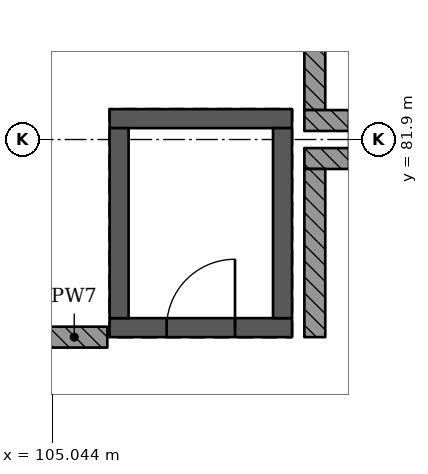
"""IFC4 building model, lengths in metres.
Left out: names, types, materials, properties, quantities, classifications, styles, units other than length and angle.
Written with IfcOpenShell. Run it as: python <this file> out.ifc"""

import sys

from ifc_helpers import new_model, si_unit, direction, frame, frame_2d, origin, place, context, subcontext, project, spatial, rectangle, extrude, element, fill, save


model = new_model("IFC4")
c1 = context("Model", 3, precision=1e-05, world=origin(), true_north=direction((0.0, 1.0)))
c2 = subcontext(c1, "Body", "Model", "MODEL_VIEW")
j1 = project(units=[si_unit("LENGTHUNIT", "METRE"), si_unit("PLANEANGLEUNIT", "RADIAN")], contexts=[c1])
p1 = place(None, origin())
s1 = spatial("IfcSite", under=j1, at=p1, CompositionType="ELEMENT")
p2 = place(p1, origin())
s2 = spatial("IfcBuilding", under=s1, at=p2, CompositionType="ELEMENT")
p3 = place(p2, frame((0.0, 0.0, 24.57)))
s3 = spatial("IfcBuildingStorey", under=s2, at=p3, CompositionType="ELEMENT", Elevation=24.57)
p4 = place(p3, frame((108.2, 79.425, 0.0), z_axis=(0.0, 0.0, 1.0), x_axis=(-1.0, 0.0, 0.0)))
e1 = element("IfcWall", 1, at=p4, inside=s3, PredefinedType="SHEAR", context=c2, shape_type="SweptSolid", body=[
    extrude(rectangle(XDim=2.4, YDim=0.25, at=frame_2d((1.2, 0.0))), origin(), (0.0, 0.0, 1.0), 4.55),
])
p5 = place(p4, frame((0.75, 0.0, 0.0)))
e2 = element("IfcOpeningElement", 2, at=p5, cuts=e1, PredefinedType="OPENING", context=c2, shape_type="SweptSolid", body=[
    extrude(rectangle(XDim=0.9, YDim=2.1, at=frame_2d((0.45, 1.05))), frame((0.0, 0.135, 0.0), z_axis=(0.0, -1.0, 0.0), x_axis=(1.0, 0.0, 0.0)), (0.0, 0.0, 1.0), 0.27),
])
p6 = place(p3, frame((108.2, 82.175, 0.0), z_axis=(0.0, 0.0, 1.0), x_axis=(-1.0, 0.0, 0.0)))
e3 = element("IfcWall", 3, at=p6, inside=s3, PredefinedType="SHEAR", context=c2, shape_type="SweptSolid", body=[
    extrude(rectangle(XDim=2.4, YDim=0.25, at=frame_2d((1.2, 0.0))), origin(), (0.0, 0.0, 1.0), 4.55),
])
for number, where, z_axis, x_axis in (
    (4, (105.925, 82.05, 0.0), (0.0, 0.0, 1.0), (0.0, -1.0, 0.0)),
    (5, (108.075, 82.05, 0.0), (0.0, 0.0, 1.0), (0.0, -1.0, 0.0)),
):
    element("IfcWall", number, at=place(p3, frame(where, z_axis=z_axis, x_axis=x_axis)), inside=s3, PredefinedType="SHEAR", context=c2, shape_type="SweptSolid", body=[
        extrude(rectangle(XDim=2.5, YDim=0.25, at=frame_2d((1.25, 0.0))), origin(), (0.0, 0.0, 1.0), 4.55),
    ])
p7 = place(p3, frame((105.77, 79.3, 0.0), z_axis=(0.0, 0.0, 1.0), x_axis=(-1.0, 0.0, 0.0)))
e6 = element("IfcWall", 6, at=p7, inside=s3, PredefinedType="SOLIDWALL", context=c2, shape_type="SweptSolid", body=[
    extrude(rectangle(XDim=0.87, YDim=0.275, at=frame_2d((0.435, 0.0))), origin(), (0.0, 0.0, 1.0), 4.35),
])
p8 = place(p3, frame((108.363, 81.65, 0.0), z_axis=(0.0, 0.0, 1.0), x_axis=(1.0, 0.0, 0.0)))
e7 = element("IfcWall", 7, at=p8, inside=s3, PredefinedType="SOLIDWALL", context=c2, shape_type="SweptSolid", body=[
    extrude(rectangle(XDim=0.587, YDim=0.275, at=frame_2d((0.294, 0.0))), origin(), (0.0, 0.0, 1.0), 4.35),
])
p9 = place(p3, frame((108.5, 79.3, 0.0), z_axis=(0.0, 0.0, 1.0), x_axis=(0.0, 1.0, 0.0)))
e8 = element("IfcWall", 8, at=p9, inside=s3, PredefinedType="SOLIDWALL", context=c2, shape_type="SweptSolid", body=[
    extrude(rectangle(XDim=2.212, YDim=0.275, at=frame_2d((1.106, 0.0))), origin(), (0.0, 0.0, 1.0), 4.35),
])
p10 = place(p3, frame((108.5, 82.288, 0.0), z_axis=(0.0, 0.0, 1.0), x_axis=(0.0, 1.0, 0.0)))
e9 = element("IfcWall", 9, at=p10, inside=s3, PredefinedType="SOLIDWALL", context=c2, shape_type="SweptSolid", body=[
    extrude(rectangle(XDim=6.975, YDim=0.275, at=frame_2d((3.487, 0.0))), origin(), (0.0, 0.0, 1.0), 4.35),
])
p11 = place(p3, frame((108.95, 82.15, 0.0), z_axis=(0.0, 0.0, 1.0), x_axis=(-1.0, 0.0, 0.0)))
e10 = element("IfcWall", 10, at=p11, inside=s3, PredefinedType="SOLIDWALL", context=c2, shape_type="SweptSolid", body=[
    extrude(rectangle(XDim=0.587, YDim=0.275, at=frame_2d((0.294, 0.0))), origin(), (0.0, 0.0, 1.0), 4.35),
])
p12 = place(p5, origin())
e11 = element("IfcDoor", 11, at=p12, inside=s3, OperationType="SINGLE_SWING_LEFT", PredefinedType="DOOR", context=c2, shape_type="SweptSolid", body=[
    extrude(rectangle(XDim=0.9, YDim=2.1, at=frame_2d((0.45, 1.05))), frame((0.0, 0.025, 0.0), z_axis=(0.0, -1.0, 0.0), x_axis=(1.0, 0.0, 0.0)), (0.0, 0.0, 1.0), 0.05),
])
fill(e2, e11)
save(model, sys.argv[1])
